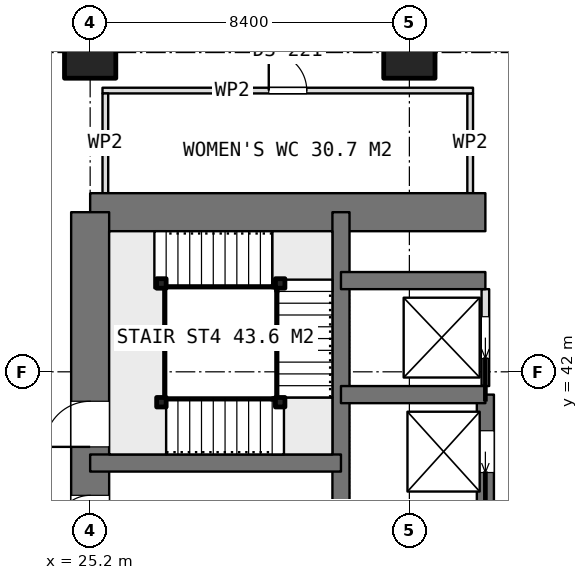
"""IFC4 building model, lengths in metres.
Left out: names, types, materials, properties, quantities, classifications, styles, units other than length and angle.
Written with IfcOpenShell. Run it as: python <this file> out.ifc"""

import sys

from ifc_helpers import new_model, si_unit, direction, frame, frame_2d, origin, origin_2d, place, context, subcontext, project, spatial, rectangle, extrude, element, fill, save


model = new_model("IFC4")
c1 = context("Model", 3, precision=1e-05, world=origin(), true_north=direction((0.0, 1.0)))
c2 = subcontext(c1, "Body", "Model", "MODEL_VIEW")
j1 = project(units=[si_unit("LENGTHUNIT", "METRE"), si_unit("PLANEANGLEUNIT", "RADIAN")], contexts=[c1])
p1 = place(None, origin())
s1 = spatial("IfcSite", under=j1, at=p1, CompositionType="ELEMENT")
p2 = place(p1, origin())
s2 = spatial("IfcBuilding", under=s1, at=p2, CompositionType="ELEMENT")
p3 = place(p2, frame((0.0, 0.0, 206.45)))
s3 = spatial("IfcBuildingStorey", under=s2, at=p3, CompositionType="ELEMENT", Elevation=206.45)
p4 = place(p3, frame((25.2, 46.2, 0.0), z_axis=(0.0, 0.0, 1.0), x_axis=(1.0, 0.0, 0.0)))
e1 = element("IfcWall", 1, at=p4, inside=s3, PredefinedType="SHEAR", context=c2, shape_type="SweptSolid", body=[
    extrude(rectangle(XDim=10.4, YDim=1.0, at=frame_2d((5.2, 0.0))), origin(), (0.0, 0.0, 1.0), 3.75),
])
p5 = place(p3, frame((25.2, 21.0, 0.0), z_axis=(0.0, 0.0, 1.0), x_axis=(0.0, 1.0, 0.0)))
e2 = element("IfcWall", 2, at=p5, inside=s3, PredefinedType="SHEAR", context=c2, shape_type="SweptSolid", body=[
    extrude(rectangle(XDim=25.2, YDim=1.0, at=frame_2d((12.6, 0.0))), origin(), (0.0, 0.0, 1.0), 3.75),
])
p6 = place(p5, frame((7.8, 0.0, 0.0)))
e3 = element("IfcOpeningElement", 3, at=p6, cuts=e2, PredefinedType="OPENING", context=c2, shape_type="SweptSolid", body=[
    extrude(rectangle(XDim=1.2, YDim=2.1, at=frame_2d((0.6, 1.05))), frame((0.0, 0.51, 0.0), z_axis=(0.0, -1.0, 0.0), x_axis=(1.0, 0.0, 0.0)), (0.0, 0.0, 1.0), 1.02),
])
p7 = place(p5, frame((14.25, 0.0, 0.0)))
e4 = element("IfcOpeningElement", 4, at=p7, cuts=e2, PredefinedType="OPENING", context=c2, shape_type="SweptSolid", body=[
    extrude(rectangle(XDim=0.9, YDim=2.1, at=frame_2d((0.45, 1.05))), frame((0.0, 0.51, 0.0), z_axis=(0.0, -1.0, 0.0), x_axis=(1.0, 0.0, 0.0)), (0.0, 0.0, 1.0), 1.02),
])
p8 = place(p5, frame((16.85, 0.0, 0.0)))
e5 = element("IfcOpeningElement", 5, at=p8, cuts=e2, PredefinedType="OPENING", context=c2, shape_type="SweptSolid", body=[
    extrude(rectangle(XDim=0.9, YDim=2.1, at=frame_2d((0.45, 1.05))), frame((0.0, 0.51, 0.0), z_axis=(0.0, -1.0, 0.0), x_axis=(1.0, 0.0, 0.0)), (0.0, 0.0, 1.0), 1.02),
])
p9 = place(p5, frame((19.025, 0.0, 0.0)))
e6 = element("IfcOpeningElement", 6, at=p9, cuts=e2, PredefinedType="OPENING", context=c2, shape_type="SweptSolid", body=[
    extrude(rectangle(XDim=1.2, YDim=2.1, at=frame_2d((0.6, 1.05))), frame((0.0, 0.51, 0.0), z_axis=(0.0, -1.0, 0.0), x_axis=(1.0, 0.0, 0.0)), (0.0, 0.0, 1.0), 1.02),
])
p10 = place(p3, frame((31.8, 21.0, 0.0), z_axis=(0.0, 0.0, 1.0), x_axis=(0.0, 1.0, 0.0)))
e7 = element("IfcWall", 7, at=p10, inside=s3, PredefinedType="SHEAR", context=c2, shape_type="SweptSolid", body=[
    extrude(rectangle(XDim=25.2, YDim=0.45, at=frame_2d((12.6, 0.0))), origin(), (0.0, 0.0, 1.0), 3.75),
])
p11 = place(p3, frame((35.6, 23.4, 0.0), z_axis=(0.0, 0.0, 1.0), x_axis=(0.0, 1.0, 0.0)))
e8 = element("IfcWall", 8, at=p11, inside=s3, PredefinedType="SHEAR", context=c2, shape_type="SweptSolid", body=[
    extrude(rectangle(XDim=18.0, YDim=0.45, at=frame_2d((9.0, 0.0))), origin(), (0.0, 0.0, 1.0), 3.75),
])
p12 = place(p11, frame((0.95, 0.0, 0.0)))
e9 = element("IfcOpeningElement", 9, at=p12, cuts=e8, PredefinedType="OPENING", context=c2, shape_type="SweptSolid", body=[
    extrude(rectangle(XDim=1.1, YDim=2.1, at=frame_2d((0.55, 1.05))), frame((0.0, 0.235, 0.0), z_axis=(0.0, -1.0, 0.0), x_axis=(1.0, 0.0, 0.0)), (0.0, 0.0, 1.0), 0.47),
])
p13 = place(p11, frame((3.95, 0.0, 0.0)))
e10 = element("IfcOpeningElement", 10, at=p13, cuts=e8, PredefinedType="OPENING", context=c2, shape_type="SweptSolid", body=[
    extrude(rectangle(XDim=1.1, YDim=2.1, at=frame_2d((0.55, 1.05))), frame((0.0, 0.235, 0.0), z_axis=(0.0, -1.0, 0.0), x_axis=(1.0, 0.0, 0.0)), (0.0, 0.0, 1.0), 0.47),
])
p14 = place(p11, frame((6.95, 0.0, 0.0)))
e11 = element("IfcOpeningElement", 11, at=p14, cuts=e8, PredefinedType="OPENING", context=c2, shape_type="SweptSolid", body=[
    extrude(rectangle(XDim=1.1, YDim=2.1, at=frame_2d((0.55, 1.05))), frame((0.0, 0.235, 0.0), z_axis=(0.0, -1.0, 0.0), x_axis=(1.0, 0.0, 0.0)), (0.0, 0.0, 1.0), 0.47),
])
p15 = place(p11, frame((9.95, 0.0, 0.0)))
e12 = element("IfcOpeningElement", 12, at=p15, cuts=e8, PredefinedType="OPENING", context=c2, shape_type="SweptSolid", body=[
    extrude(rectangle(XDim=1.1, YDim=2.1, at=frame_2d((0.55, 1.05))), frame((0.0, 0.235, 0.0), z_axis=(0.0, -1.0, 0.0), x_axis=(1.0, 0.0, 0.0)), (0.0, 0.0, 1.0), 0.47),
])
p16 = place(p11, frame((12.95, 0.0, 0.0)))
e13 = element("IfcOpeningElement", 13, at=p16, cuts=e8, PredefinedType="OPENING", context=c2, shape_type="SweptSolid", body=[
    extrude(rectangle(XDim=1.1, YDim=2.1, at=frame_2d((0.55, 1.05))), frame((0.0, 0.235, 0.0), z_axis=(0.0, -1.0, 0.0), x_axis=(1.0, 0.0, 0.0)), (0.0, 0.0, 1.0), 0.47),
])
p17 = place(p11, frame((15.95, 0.0, 0.0)))
e14 = element("IfcOpeningElement", 14, at=p17, cuts=e8, PredefinedType="OPENING", context=c2, shape_type="SweptSolid", body=[
    extrude(rectangle(XDim=1.1, YDim=2.1, at=frame_2d((0.55, 1.05))), frame((0.0, 0.235, 0.0), z_axis=(0.0, -1.0, 0.0), x_axis=(1.0, 0.0, 0.0)), (0.0, 0.0, 1.0), 0.47),
])
for number, where, z_axis, x_axis in (
    (15, (31.8, 41.4, 0.0), (0.0, 0.0, 1.0), (1.0, 0.0, 0.0)),
    (16, (31.8, 44.4, 0.0), (0.0, 0.0, 1.0), (1.0, 0.0, 0.0)),
):
    element("IfcWall", number, at=place(p3, frame(where, z_axis=z_axis, x_axis=x_axis)), inside=s3, PredefinedType="SHEAR", context=c2, shape_type="SweptSolid", body=[
        extrude(rectangle(XDim=3.8, YDim=0.45, at=frame_2d((1.9, 0.0))), origin(), (0.0, 0.0, 1.0), 3.75),
    ])
p18 = place(p3, frame((25.2, 39.6, 0.0), z_axis=(0.0, 0.0, 1.0), x_axis=(1.0, 0.0, 0.0)))
e17 = element("IfcWall", 17, at=p18, inside=s3, PredefinedType="SHEAR", context=c2, shape_type="SweptSolid", body=[
    extrude(rectangle(XDim=6.6, YDim=0.45, at=frame_2d((3.3, 0.0))), origin(), (0.0, 0.0, 1.0), 3.75),
])
for number, where, z_axis, x_axis in (
    (18, (25.2, 50.4, 0.0), (0.0, 0.0, 1.0), (1.0, 0.0, 0.0)),
    (19, (33.6, 50.4, 0.0), (0.0, 0.0, 1.0), (1.0, 0.0, 0.0)),
):
    element("IfcColumn", number, at=place(p3, frame(where, z_axis=z_axis, x_axis=x_axis)), inside=s3, PredefinedType="COLUMN", context=c2, shape_type="SweptSolid", body=[
        extrude(rectangle(XDim=1.35, YDim=1.35, at=origin_2d()), origin(), (0.0, 0.0, 1.0), 3.75),
    ])
p19 = place(p3, frame((35.6, 41.625, 0.0), z_axis=(0.0, 0.0, 1.0), x_axis=(0.0, 1.0, 0.0)))
e20 = element("IfcWall", 20, at=p19, inside=s3, PredefinedType="PARTITIONING", context=c2, shape_type="SweptSolid", body=[
    extrude(rectangle(XDim=2.55, YDim=0.2, at=frame_2d((1.275, 0.0))), origin(), (0.0, 0.0, 1.0), 3.5),
])
p20 = place(p19, frame((0.725, 0.0, 0.0)))
e21 = element("IfcOpeningElement", 21, at=p20, cuts=e20, PredefinedType="OPENING", context=c2, shape_type="SweptSolid", body=[
    extrude(rectangle(XDim=1.1, YDim=2.1, at=frame_2d((0.55, 1.05))), frame((0.0, 0.11, 0.0), z_axis=(0.0, -1.0, 0.0), x_axis=(1.0, 0.0, 0.0)), (0.0, 0.0, 1.0), 0.22),
])
p21 = place(p3, frame((25.525, 49.4, 0.0), z_axis=(0.0, 0.0, 1.0), x_axis=(1.0, 0.0, 0.0)))
e22 = element("IfcWall", 22, at=p21, inside=s3, PredefinedType="PARTITIONING", context=c2, shape_type="SweptSolid", body=[
    extrude(rectangle(XDim=9.75, YDim=0.15, at=frame_2d((4.875, 0.0))), origin(), (0.0, 0.0, 1.0), 3.5),
])
p22 = place(p21, frame((4.375, 0.0, 0.0)))
e23 = element("IfcOpeningElement", 23, at=p22, cuts=e22, PredefinedType="OPENING", context=c2, shape_type="SweptSolid", body=[
    extrude(rectangle(XDim=1.0, YDim=2.1, at=frame_2d((0.5, 1.05))), frame((0.0, 0.085, 0.0), z_axis=(0.0, -1.0, 0.0), x_axis=(1.0, 0.0, 0.0)), (0.0, 0.0, 1.0), 0.17),
])
for number, where, z_axis, x_axis in (
    (24, (25.6, 46.7, 0.0), (0.0, 0.0, 1.0), (0.0, 1.0, 0.0)),
    (25, (35.2, 46.7, 0.0), (0.0, 0.0, 1.0), (0.0, 1.0, 0.0)),
):
    element("IfcWall", number, at=place(p3, frame(where, z_axis=z_axis, x_axis=x_axis)), inside=s3, PredefinedType="PARTITIONING", context=c2, shape_type="SweptSolid", body=[
        extrude(rectangle(XDim=2.625, YDim=0.15, at=frame_2d((1.312, 0.0))), origin(), (0.0, 0.0, 1.0), 3.5),
    ])
for number, where, z_axis, x_axis in (
    (26, (27.075, 41.2, 0.0), (0.0, 0.0, 1.0), (1.0, 0.0, 0.0)),
    (27, (30.2, 41.2, 0.0), (0.0, 0.0, 1.0), (1.0, 0.0, 0.0)),
    (28, (30.2, 44.325, 0.0), (0.0, 0.0, 1.0), (1.0, 0.0, 0.0)),
    (29, (27.075, 44.325, 0.0), (0.0, 0.0, 1.0), (1.0, 0.0, 0.0)),
):
    element("IfcColumn", number, at=place(p3, frame(where, z_axis=z_axis, x_axis=x_axis)), inside=s3, PredefinedType="COLUMN", context=c2, shape_type="SweptSolid", body=[
        extrude(rectangle(XDim=0.25, YDim=0.25, at=origin_2d()), origin(), (0.0, 0.0, 1.0), 3.75),
    ])
p23 = place(p8, origin())
e30 = element("IfcDoor", 30, at=p23, inside=s3, OperationType="SINGLE_SWING_LEFT", PredefinedType="DOOR", context=c2, shape_type="SweptSolid", body=[
    extrude(rectangle(XDim=0.9, YDim=2.1, at=frame_2d((0.45, 1.05))), frame((0.0, 0.025, 0.0), z_axis=(0.0, -1.0, 0.0), x_axis=(1.0, 0.0, 0.0)), (0.0, 0.0, 1.0), 0.05),
])
fill(e5, e30)
p24 = place(p17, origin())
e31 = element("IfcDoor", 31, at=p24, inside=s3, OperationType="SLIDING_TO_LEFT", PredefinedType="USERDEFINED", context=c2, shape_type="SweptSolid", body=[
    extrude(rectangle(XDim=1.1, YDim=2.1, at=frame_2d((0.55, 1.05))), frame((0.0, 0.025, 0.0), z_axis=(0.0, -1.0, 0.0), x_axis=(1.0, 0.0, 0.0)), (0.0, 0.0, 1.0), 0.05),
])
fill(e14, e31)
p25 = place(p20, origin())
e32 = element("IfcDoor", 32, at=p25, inside=s3, OperationType="SLIDING_TO_LEFT", PredefinedType="USERDEFINED", context=c2, shape_type="SweptSolid", body=[
    extrude(rectangle(XDim=1.1, YDim=2.1, at=frame_2d((0.55, 1.05))), frame((0.0, 0.025, 0.0), z_axis=(0.0, -1.0, 0.0), x_axis=(1.0, 0.0, 0.0)), (0.0, 0.0, 1.0), 0.05),
])
fill(e21, e32)
p26 = place(p22, origin())
e33 = element("IfcDoor", 33, at=p26, inside=s3, OperationType="SINGLE_SWING_LEFT", PredefinedType="DOOR", context=c2, shape_type="SweptSolid", body=[
    extrude(rectangle(XDim=1.0, YDim=2.1, at=frame_2d((0.5, 1.05))), frame((0.0, 0.025, 0.0), z_axis=(0.0, -1.0, 0.0), x_axis=(1.0, 0.0, 0.0)), (0.0, 0.0, 1.0), 0.05),
])
fill(e23, e33)
p27 = place(p9, origin())
e34 = element("IfcDoor", 34, at=p27, inside=s3, OperationType="SINGLE_SWING_RIGHT", PredefinedType="DOOR", context=c2, shape_type="SweptSolid", body=[
    extrude(rectangle(XDim=1.2, YDim=2.1, at=frame_2d((0.6, 1.05))), frame((0.0, 0.025, 0.0), z_axis=(0.0, -1.0, 0.0), x_axis=(1.0, 0.0, 0.0)), (0.0, 0.0, 1.0), 0.05),
])
fill(e6, e34)
save(model, sys.argv[1])
